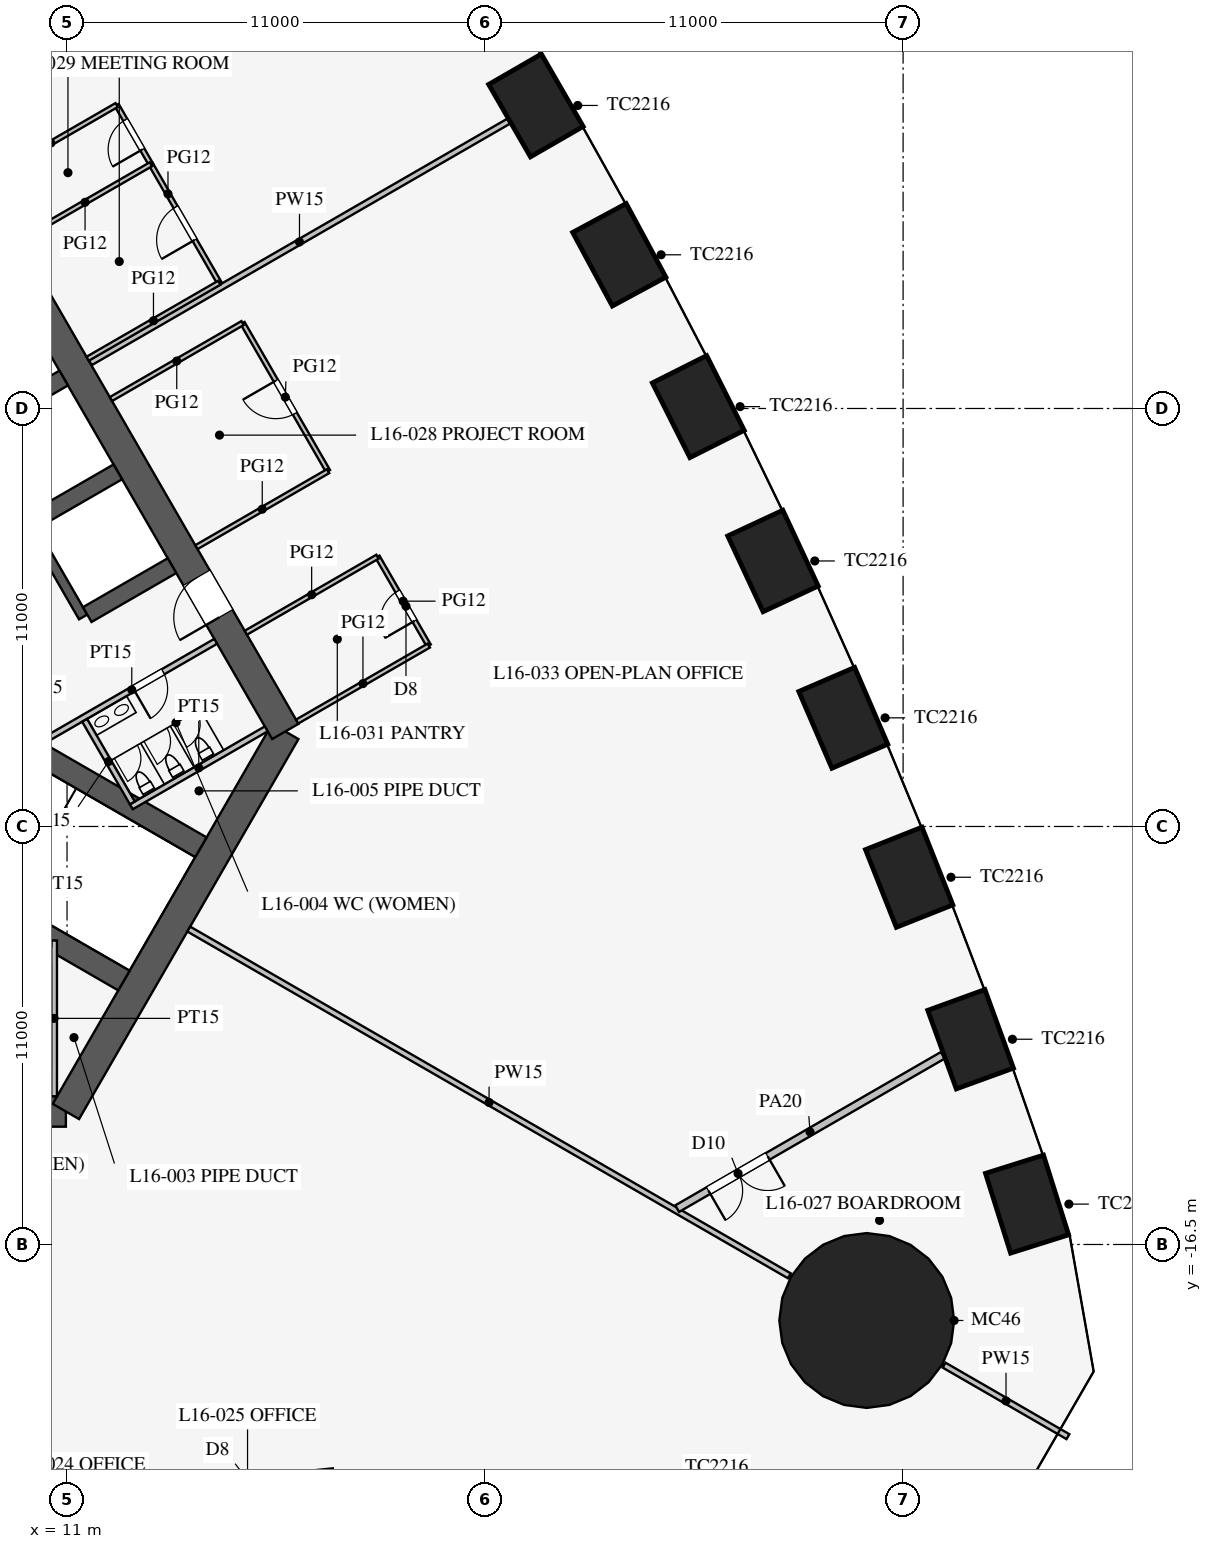
"""IFC4 building model, lengths in metres.
Left out: names, types, materials, properties, quantities, classifications, styles, units other than length and angle.
Written with IfcOpenShell. Run it as: python <this file> out.ifc"""

import sys

from ifc_helpers import new_model, si_unit, direction, frame, frame_2d, origin, origin_2d, place, context, subcontext, project, spatial, rectangle, circle, extrude, element, fill, save


model = new_model("IFC4")
c1 = context("Model", 3, precision=1e-05, world=origin(), true_north=direction((0.0, 1.0)))
c2 = subcontext(c1, "Body", "Model", "MODEL_VIEW")
j1 = project(units=[si_unit("LENGTHUNIT", "METRE"), si_unit("PLANEANGLEUNIT", "RADIAN")], contexts=[c1])
p1 = place(None, origin())
s1 = spatial("IfcSite", under=j1, at=p1, CompositionType="ELEMENT")
p2 = place(p1, origin())
s2 = spatial("IfcBuilding", under=s1, at=p2, CompositionType="ELEMENT")
p3 = place(p2, frame((0.0, 0.0, 71.1)))
s3 = spatial("IfcBuildingStorey", under=s2, at=p3, CompositionType="ELEMENT", Elevation=71.1)
for number, where, z_axis, x_axis in (
    (1, (36.262, -15.438, 0.0), (0.0, 0.0, 1.0), (-0.3, 0.954, 0.0)),
    (2, (34.776, -11.099, 0.0), (0.0, 0.0, 1.0), (-0.342, 0.94, 0.0)),
    (3, (33.16, -6.836, 0.0), (0.0, 0.0, 1.0), (-0.369, 0.929, 0.0)),
    (4, (31.426, -2.641, 0.0), (0.0, 0.0, 1.0), (-0.396, 0.918, 0.0)),
    (5, (29.576, 1.487, 0.0), (0.0, 0.0, 1.0), (-0.423, 0.906, 0.0)),
    (6, (27.611, 5.549, 0.0), (0.0, 0.0, 1.0), (-0.449, 0.894, 0.0)),
    (7, (25.531, 9.544, 0.0), (0.0, 0.0, 1.0), (-0.475, 0.88, 0.0)),
    (8, (23.338, 13.474, 0.0), (0.0, 0.0, 1.0), (-0.5, 0.866, 0.0)),
):
    element("IfcColumn", number, at=place(p3, frame(where, z_axis=z_axis, x_axis=x_axis)), inside=s3, PredefinedType="COLUMN", context=c2, shape_type="SweptSolid", body=[
        extrude(rectangle(XDim=2.2, YDim=1.6, at=origin_2d()), origin(), (0.0, 0.0, 1.0), 4.2),
    ])
p4 = place(p3, frame((32.043, -18.5, 0.0), z_axis=(0.0, 0.0, 1.0), x_axis=(1.0, 0.0, 0.0)))
e9 = element("IfcColumn", 9, at=p4, inside=s3, PredefinedType="COLUMN", context=c2, shape_type="SweptSolid", body=[
    extrude(circle(Radius=2.3, at=origin_2d()), origin(), (0.0, 0.0, 1.0), 4.2),
])
p5 = place(p3, frame((-10.97, -13.0, 0.0), z_axis=(0.0, 0.0, 1.0), x_axis=(1.0, 0.0, 0.0)))
e10 = element("IfcWall", 10, at=p5, inside=s3, PredefinedType="SHEAR", context=c2, shape_type="SweptSolid", body=[
    extrude(rectangle(XDim=21.939, YDim=0.8, at=frame_2d((10.97, 0.0))), origin(), (0.0, 0.0, 1.0), 4.2),
])
p6 = place(p5, frame((17.27, 0.0, 0.0)))
e11 = element("IfcOpeningElement", 11, at=p6, cuts=e10, PredefinedType="OPENING", context=c2, shape_type="SweptSolid", body=[
    extrude(rectangle(XDim=1.2, YDim=2.1, at=frame_2d((0.6, 1.05))), frame((0.0, 0.41, 0.0), z_axis=(0.0, -1.0, 0.0), x_axis=(1.0, 0.0, 0.0)), (0.0, 0.0, 1.0), 0.82),
])
p7 = place(p5, frame((3.47, 0.0, 0.0)))
e12 = element("IfcOpeningElement", 12, at=p7, cuts=e10, PredefinedType="OPENING", context=c2, shape_type="SweptSolid", body=[
    extrude(rectangle(XDim=1.2, YDim=2.1, at=frame_2d((0.6, 1.05))), frame((0.0, 0.41, 0.0), z_axis=(0.0, -1.0, 0.0), x_axis=(1.0, 0.0, 0.0)), (0.0, 0.0, 1.0), 0.82),
])
p8 = place(p3, frame((10.97, -13.0, 0.0), z_axis=(0.0, 0.0, 1.0), x_axis=(0.499995765644, 0.866027848477, 0.0)))
e13 = element("IfcWall", 13, at=p8, inside=s3, PredefinedType="SHEAR", context=c2, shape_type="SweptSolid", body=[
    extrude(rectangle(XDim=11.547, YDim=0.8, at=frame_2d((5.773, 0.0))), origin(), (0.0, 0.0, 1.0), 4.2),
])
p9 = place(p3, frame((16.743, -3.0, 0.0), z_axis=(0.0, 0.0, 1.0), x_axis=(-0.500002442456, 0.866023993627, 0.0)))
e14 = element("IfcWall", 14, at=p9, inside=s3, PredefinedType="SHEAR", context=c2, shape_type="SweptSolid", body=[
    extrude(rectangle(XDim=21.939, YDim=0.8, at=frame_2d((10.97, 0.0))), origin(), (0.0, 0.0, 1.0), 4.2),
])
p10 = place(p9, frame((17.27, 0.0, 0.0)))
e15 = element("IfcOpeningElement", 15, at=p10, cuts=e14, PredefinedType="OPENING", context=c2, shape_type="SweptSolid", body=[
    extrude(rectangle(XDim=1.2, YDim=2.1, at=frame_2d((0.6, 1.05))), frame((0.0, 0.41, 0.0), z_axis=(0.0, -1.0, 0.0), x_axis=(1.0, 0.0, 0.0)), (0.0, 0.0, 1.0), 0.82),
])
p11 = place(p9, frame((3.47, 0.0, 0.0)))
e16 = element("IfcOpeningElement", 16, at=p11, cuts=e14, PredefinedType="OPENING", context=c2, shape_type="SweptSolid", body=[
    extrude(rectangle(XDim=1.2, YDim=2.1, at=frame_2d((0.6, 1.05))), frame((0.0, 0.41, 0.0), z_axis=(0.0, -1.0, 0.0), x_axis=(1.0, 0.0, 0.0)), (0.0, 0.0, 1.0), 0.82),
])
p12 = place(p3, frame((11.424, 0.014, 0.0), z_axis=(0.0, 0.0, 1.0), x_axis=(-0.500001763848, 0.866024385424, 0.0)))
e17 = element("IfcWall", 17, at=p12, inside=s3, PredefinedType="SHEAR", context=c2, shape_type="SweptSolid", body=[
    extrude(rectangle(XDim=11.4, YDim=0.25, at=frame_2d((5.7, 0.0))), origin(), (0.0, 0.0, 1.0), 4.2),
])
for number, where, z_axis, x_axis in (
    (18, (11.532, 0.076, 0.0), (0.0, 0.0, 1.0), (0.866, 0.5, 0.0)),
    (19, (10.107, 2.544, 0.0), (0.0, 0.0, 1.0), (0.866, 0.5, 0.0)),
    (20, (8.682, 5.012, 0.0), (0.0, 0.0, 1.0), (0.866, 0.5, 0.0)),
):
    element("IfcWall", number, at=place(p3, frame(where, z_axis=z_axis, x_axis=x_axis)), inside=s3, PredefinedType="SHEAR", context=c2, shape_type="SweptSolid", body=[
        extrude(rectangle(XDim=2.575, YDim=0.45, at=frame_2d((1.288, 0.0))), origin(), (0.0, 0.0, 1.0), 4.2),
    ])
for number, where, z_axis, x_axis in (
    (21, (4.638, -5.016, 0.0), (0.0, 0.0, 1.0), (0.866, -0.5, 0.0)),
    (22, (6.663, -1.509, 0.0), (0.0, 0.0, 1.0), (0.866, -0.5, 0.0)),
):
    element("IfcWall", number, at=place(p3, frame(where, z_axis=z_axis, x_axis=x_axis)), inside=s3, PredefinedType="SHEAR", context=c2, shape_type="SweptSolid", body=[
        extrude(rectangle(XDim=9.075, YDim=0.6, at=frame_2d((4.538, 0.0))), origin(), (0.0, 0.0, 1.0), 4.2),
    ])
p13 = place(p3, frame((10.495, -3.178, 0.0), z_axis=(0.0, 0.0, 1.0), x_axis=(0.86602216432, 0.500005610874, 0.0)))
e23 = element("IfcWall", 23, at=p13, inside=s3, PredefinedType="PARTITIONING", context=c2, shape_type="SweptSolid", body=[
    extrude(rectangle(XDim=5.1, YDim=0.15, at=frame_2d((2.55, 0.0))), origin(), (0.0, 0.0, 1.0), 4.0),
])
p14 = place(p13, frame((2.6, 0.0, 0.0)))
e24 = element("IfcOpeningElement", 24, at=p14, cuts=e23, PredefinedType="OPENING", context=c2, shape_type="SweptSolid", body=[
    extrude(rectangle(XDim=0.9, YDim=2.1, at=frame_2d((0.45, 1.05))), frame((0.0, 0.085, 0.0), z_axis=(0.0, -1.0, 0.0), x_axis=(1.0, 0.0, 0.0)), (0.0, 0.0, 1.0), 0.17),
])
for number, where, z_axis, x_axis in (
    (25, (10.66, -8.5, 0.0), (0.0, 0.0, 1.0), (0.0, -1.0, 0.0)),
    (26, (12.691, -4.982, 0.0), (0.0, 0.0, 1.0), (0.866, 0.5, 0.0)),
):
    element("IfcWall", number, at=place(p3, frame(where, z_axis=z_axis, x_axis=x_axis)), inside=s3, PredefinedType="PARTITIONING", context=c2, shape_type="SweptSolid", body=[
        extrude(rectangle(XDim=4.1, YDim=0.15, at=frame_2d((2.05, 0.0))), origin(), (0.0, 0.0, 1.0), 4.0),
    ])
p15 = place(p3, frame((11.464, -2.706, 0.0), z_axis=(0.0, 0.0, 1.0), x_axis=(0.50001992892, -0.866013897511, 0.0)))
e27 = element("IfcWall", 27, at=p15, inside=s3, PredefinedType="PARTITIONING", context=c2, shape_type="SweptSolid", body=[
    extrude(rectangle(XDim=2.51, YDim=0.15, at=frame_2d((1.255, 0.0))), origin(), (0.0, 0.0, 1.0), 4.0),
])
p16 = place(p3, frame((14.203, -8.2, 0.0), z_axis=(0.0, 0.0, 1.0), x_axis=(0.866024965723, -0.500000758745, 0.0)))
e28 = element("IfcWall", 28, at=p16, inside=s3, PredefinedType="PARTITIONING", context=c2, shape_type="SweptSolid", body=[
    extrude(rectangle(XDim=18.25, YDim=0.15, at=frame_2d((9.125, 0.0))), origin(), (0.0, 0.0, 1.0), 2.3),
])
p17 = place(p3, frame((34.078, -19.675, 0.0), z_axis=(0.0, 0.0, 1.0), x_axis=(0.866019247219, -0.500010663332, 0.0)))
e29 = element("IfcWall", 29, at=p17, inside=s3, PredefinedType="PARTITIONING", context=c2, shape_type="SweptSolid", body=[
    extrude(rectangle(XDim=3.764, YDim=0.15, at=frame_2d((1.882, 0.0))), origin(), (0.0, 0.0, 1.0), 2.3),
])
p18 = place(p3, frame((13.5, -22.91, 0.0), z_axis=(0.0, 0.0, 1.0), x_axis=(0.994833141332, 0.101523499286, 0.0)))
e30 = element("IfcWall", 30, at=p18, inside=s3, PredefinedType="PARTITIONING", context=c2, shape_type="SweptSolid", body=[
    extrude(rectangle(XDim=4.523, YDim=0.12, at=frame_2d((2.262, 0.0))), origin(), (0.0, 0.0, 1.0), 2.9),
])
p19 = place(p18, frame((1.8, 0.0, 0.15)))
e31 = element("IfcOpeningElement", 31, at=p19, cuts=e30, PredefinedType="OPENING", context=c2, shape_type="SweptSolid", body=[
    extrude(rectangle(XDim=0.9, YDim=2.1, at=frame_2d((0.45, 1.05))), frame((0.0, 0.07, 0.0), z_axis=(0.0, -1.0, 0.0), x_axis=(1.0, 0.0, 0.0)), (0.0, 0.0, 1.0), 0.14),
])
p20 = place(p3, frame((11.613, 6.705, 0.0), z_axis=(0.0, 0.0, 1.0), x_axis=(0.866029791586, 0.499992400027, 0.0)))
e32 = element("IfcWall", 32, at=p20, inside=s3, PredefinedType="PARTITIONING", context=c2, shape_type="SweptSolid", body=[
    extrude(rectangle(XDim=12.709, YDim=0.15, at=frame_2d((6.354, 0.0))), origin(), (0.0, 0.0, 1.0), 2.8),
])
p21 = place(p3, frame((15.006, 8.808, 0.0), z_axis=(0.0, 0.0, 1.0), x_axis=(-0.500012057535, 0.866018442252, 0.0)))
e33 = element("IfcWall", 33, at=p21, inside=s3, PredefinedType="PARTITIONING", context=c2, shape_type="SweptSolid", body=[
    extrude(rectangle(XDim=3.6, YDim=0.12, at=frame_2d((1.8, 0.0))), origin(), (0.0, 0.0, 1.0), 2.9),
])
p22 = place(p21, frame((1.3, 0.0, 0.15)))
e34 = element("IfcOpeningElement", 34, at=p22, cuts=e33, PredefinedType="OPENING", context=c2, shape_type="SweptSolid", body=[
    extrude(rectangle(XDim=1.0, YDim=2.1, at=frame_2d((0.5, 1.05))), frame((0.0, 0.07, 0.0), z_axis=(0.0, -1.0, 0.0), x_axis=(1.0, 0.0, 0.0)), (0.0, 0.0, 1.0), 0.14),
])
p23 = place(p3, frame((13.206, 11.926, 0.0), z_axis=(0.0, 0.0, 1.0), x_axis=(-0.499961193289, 0.866047807691, 0.0)))
e35 = element("IfcWall", 35, at=p23, inside=s3, PredefinedType="PARTITIONING", context=c2, shape_type="SweptSolid", body=[
    extrude(rectangle(XDim=1.8, YDim=0.12, at=frame_2d((0.9, 0.0))), origin(), (0.0, 0.0, 1.0), 2.9),
])
p24 = place(p23, frame((0.45, 0.0, 0.15)))
e36 = element("IfcOpeningElement", 36, at=p24, cuts=e35, PredefinedType="OPENING", context=c2, shape_type="SweptSolid", body=[
    extrude(rectangle(XDim=0.9, YDim=2.1, at=frame_2d((0.45, 1.05))), frame((0.0, 0.07, 0.0), z_axis=(0.0, -1.0, 0.0), x_axis=(1.0, 0.0, 0.0)), (0.0, 0.0, 1.0), 0.14),
])
p25 = place(p3, frame((20.519, -0.74, 0.0), z_axis=(0.0, 0.0, 1.0), x_axis=(-0.4999416173, 0.866059108428, 0.0)))
e37 = element("IfcWall", 37, at=p25, inside=s3, PredefinedType="PARTITIONING", context=c2, shape_type="SweptSolid", body=[
    extrude(rectangle(XDim=2.7, YDim=0.12, at=frame_2d((1.35, 0.0))), origin(), (0.0, 0.0, 1.0), 2.9),
])
p26 = place(p25, frame((0.75, 0.0, 0.15)))
e38 = element("IfcOpeningElement", 38, at=p26, cuts=e37, PredefinedType="OPENING", context=c2, shape_type="SweptSolid", body=[
    extrude(rectangle(XDim=0.9, YDim=2.1, at=frame_2d((0.45, 1.05))), frame((0.0, 0.07, 0.0), z_axis=(0.0, -1.0, 0.0), x_axis=(1.0, 0.0, 0.0)), (0.0, 0.0, 1.0), 0.14),
])
p27 = place(p3, frame((17.869, 3.85, 0.0), z_axis=(0.0, 0.0, 1.0), x_axis=(-0.500013631625, 0.866017533419, 0.0)))
e39 = element("IfcWall", 39, at=p27, inside=s3, PredefinedType="PARTITIONING", context=c2, shape_type="SweptSolid", body=[
    extrude(rectangle(XDim=4.5, YDim=0.12, at=frame_2d((2.25, 0.0))), origin(), (0.0, 0.0, 1.0), 2.9),
])
p28 = place(p27, frame((1.75, 0.0, 0.15)))
e40 = element("IfcOpeningElement", 40, at=p28, cuts=e39, PredefinedType="OPENING", context=c2, shape_type="SweptSolid", body=[
    extrude(rectangle(XDim=1.0, YDim=2.1, at=frame_2d((0.5, 1.05))), frame((0.0, 0.07, 0.0), z_axis=(0.0, -1.0, 0.0), x_axis=(1.0, 0.0, 0.0)), (0.0, 0.0, 1.0), 0.14),
])
p29 = place(p3, frame((11.542, 6.808, 0.0), z_axis=(0.0, 0.0, 1.0), x_axis=(0.866026010844, 0.49999894854, 0.0)))
e41 = element("IfcWall", 41, at=p29, inside=s3, PredefinedType="PARTITIONING", context=c2, shape_type="SweptSolid", body=[
    extrude(rectangle(XDim=4.0, YDim=0.12, at=frame_2d((2.0, 0.0))), origin(), (0.0, 0.0, 1.0), 2.8),
])
for number, where, z_axis, x_axis in (
    (42, (9.742, 9.926, 0.0), (0.0, 0.0, 1.0), (0.866, 0.5, 0.0)),
    (43, (8.842, 11.485, 0.0), (0.0, 0.0, 1.0), (0.866, 0.5, 0.0)),
    (44, (12.155, 5.747, 0.0), (0.0, 0.0, 1.0), (0.866, 0.5, 0.0)),
    (45, (17.055, -2.74, 0.0), (0.0, 0.0, 1.0), (0.866, 0.5, 0.0)),
    (46, (14.405, 1.85, 0.0), (0.0, 0.0, 1.0), (0.866, 0.5, 0.0)),
    (47, (15.705, -0.401, 0.0), (0.0, 0.0, 1.0), (0.866, 0.5, 0.0)),
):
    element("IfcWall", number, at=place(p3, frame(where, z_axis=z_axis, x_axis=x_axis)), inside=s3, PredefinedType="PARTITIONING", context=c2, shape_type="SweptSolid", body=[
        extrude(rectangle(XDim=4.0, YDim=0.12, at=frame_2d((2.0, 0.0))), origin(), (0.0, 0.0, 1.0), 2.9),
    ])
p30 = place(p3, frame((27.055, -15.557, 0.0), z_axis=(0.0, 0.0, 1.0), x_axis=(0.866027459735, 0.499996438971, 0.0)))
e48 = element("IfcWall", 48, at=p30, inside=s3, PredefinedType="PARTITIONING", context=c2, shape_type="SweptSolid", body=[
    extrude(rectangle(XDim=8.073, YDim=0.2, at=frame_2d((4.037, 0.0))), origin(), (0.0, 0.0, 1.0), 2.9),
])
p31 = place(p30, frame((0.95, 0.0, 0.15)))
e49 = element("IfcOpeningElement", 49, at=p31, cuts=e48, PredefinedType="OPENING", context=c2, shape_type="SweptSolid", body=[
    extrude(rectangle(XDim=1.8, YDim=2.1, at=frame_2d((0.9, 1.05))), frame((0.0, 0.11, 0.0), z_axis=(0.0, -1.0, 0.0), x_axis=(1.0, 0.0, 0.0)), (0.0, 0.0, 1.0), 0.22),
])
p32 = place(p14, frame((0.9, 0.0, 0.0), z_axis=(0.0, 0.0, 1.0), x_axis=(-1.0, 0.0, 0.0)))
e50 = element("IfcDoor", 50, at=p32, inside=s3, OperationType="SINGLE_SWING_RIGHT", PredefinedType="DOOR", context=c2, shape_type="SweptSolid", body=[
    extrude(rectangle(XDim=0.9, YDim=2.1, at=frame_2d((0.45, 1.05))), frame((0.0, 0.025, 0.0), z_axis=(0.0, -1.0, 0.0), x_axis=(1.0, 0.0, 0.0)), (0.0, 0.0, 1.0), 0.05),
])
fill(e24, e50)
p33 = place(p11, origin())
e51 = element("IfcDoor", 51, at=p33, inside=s3, OperationType="SINGLE_SWING_LEFT", PredefinedType="DOOR", context=c2, shape_type="SweptSolid", body=[
    extrude(rectangle(XDim=1.2, YDim=2.1, at=frame_2d((0.6, 1.05))), frame((0.0, 0.025, 0.0), z_axis=(0.0, -1.0, 0.0), x_axis=(1.0, 0.0, 0.0)), (0.0, 0.0, 1.0), 0.05),
])
fill(e16, e51)
p34 = place(p31, frame((1.8, 0.0, 0.0), z_axis=(0.0, 0.0, 1.0), x_axis=(-1.0, 0.0, 0.0)))
e52 = element("IfcDoor", 52, at=p34, inside=s3, OperationType="DOUBLE_DOOR_SINGLE_SWING", PredefinedType="DOOR", context=c2, shape_type="SweptSolid", body=[
    extrude(rectangle(XDim=1.8, YDim=2.1, at=frame_2d((0.9, 1.05))), frame((0.0, 0.025, 0.0), z_axis=(0.0, -1.0, 0.0), x_axis=(1.0, 0.0, 0.0)), (0.0, 0.0, 1.0), 0.05),
])
fill(e49, e52)
p35 = place(p28, origin())
e53 = element("IfcDoor", 53, at=p35, inside=s3, OperationType="SINGLE_SWING_RIGHT", PredefinedType="DOOR", context=c2, shape_type="SweptSolid", body=[
    extrude(rectangle(XDim=1.0, YDim=2.1, at=frame_2d((0.5, 1.05))), frame((0.0, 0.025, 0.0), z_axis=(0.0, -1.0, 0.0), x_axis=(1.0, 0.0, 0.0)), (0.0, 0.0, 1.0), 0.05),
])
fill(e40, e53)
p36 = place(p22, origin())
e54 = element("IfcDoor", 54, at=p36, inside=s3, OperationType="SINGLE_SWING_LEFT", PredefinedType="DOOR", context=c2, shape_type="SweptSolid", body=[
    extrude(rectangle(XDim=1.0, YDim=2.1, at=frame_2d((0.5, 1.05))), frame((0.0, 0.025, 0.0), z_axis=(0.0, -1.0, 0.0), x_axis=(1.0, 0.0, 0.0)), (0.0, 0.0, 1.0), 0.05),
])
fill(e34, e54)
p37 = place(p24, origin())
e55 = element("IfcDoor", 55, at=p37, inside=s3, OperationType="SINGLE_SWING_LEFT", PredefinedType="DOOR", context=c2, shape_type="SweptSolid", body=[
    extrude(rectangle(XDim=0.9, YDim=2.1, at=frame_2d((0.45, 1.05))), frame((0.0, 0.025, 0.0), z_axis=(0.0, -1.0, 0.0), x_axis=(1.0, 0.0, 0.0)), (0.0, 0.0, 1.0), 0.05),
])
fill(e36, e55)
p38 = place(p26, origin())
e56 = element("IfcDoor", 56, at=p38, inside=s3, OperationType="SINGLE_SWING_LEFT", PredefinedType="DOOR", context=c2, shape_type="SweptSolid", body=[
    extrude(rectangle(XDim=0.9, YDim=2.1, at=frame_2d((0.45, 1.05))), frame((0.0, 0.025, 0.0), z_axis=(0.0, -1.0, 0.0), x_axis=(1.0, 0.0, 0.0)), (0.0, 0.0, 1.0), 0.05),
])
fill(e38, e56)
save(model, sys.argv[1])
